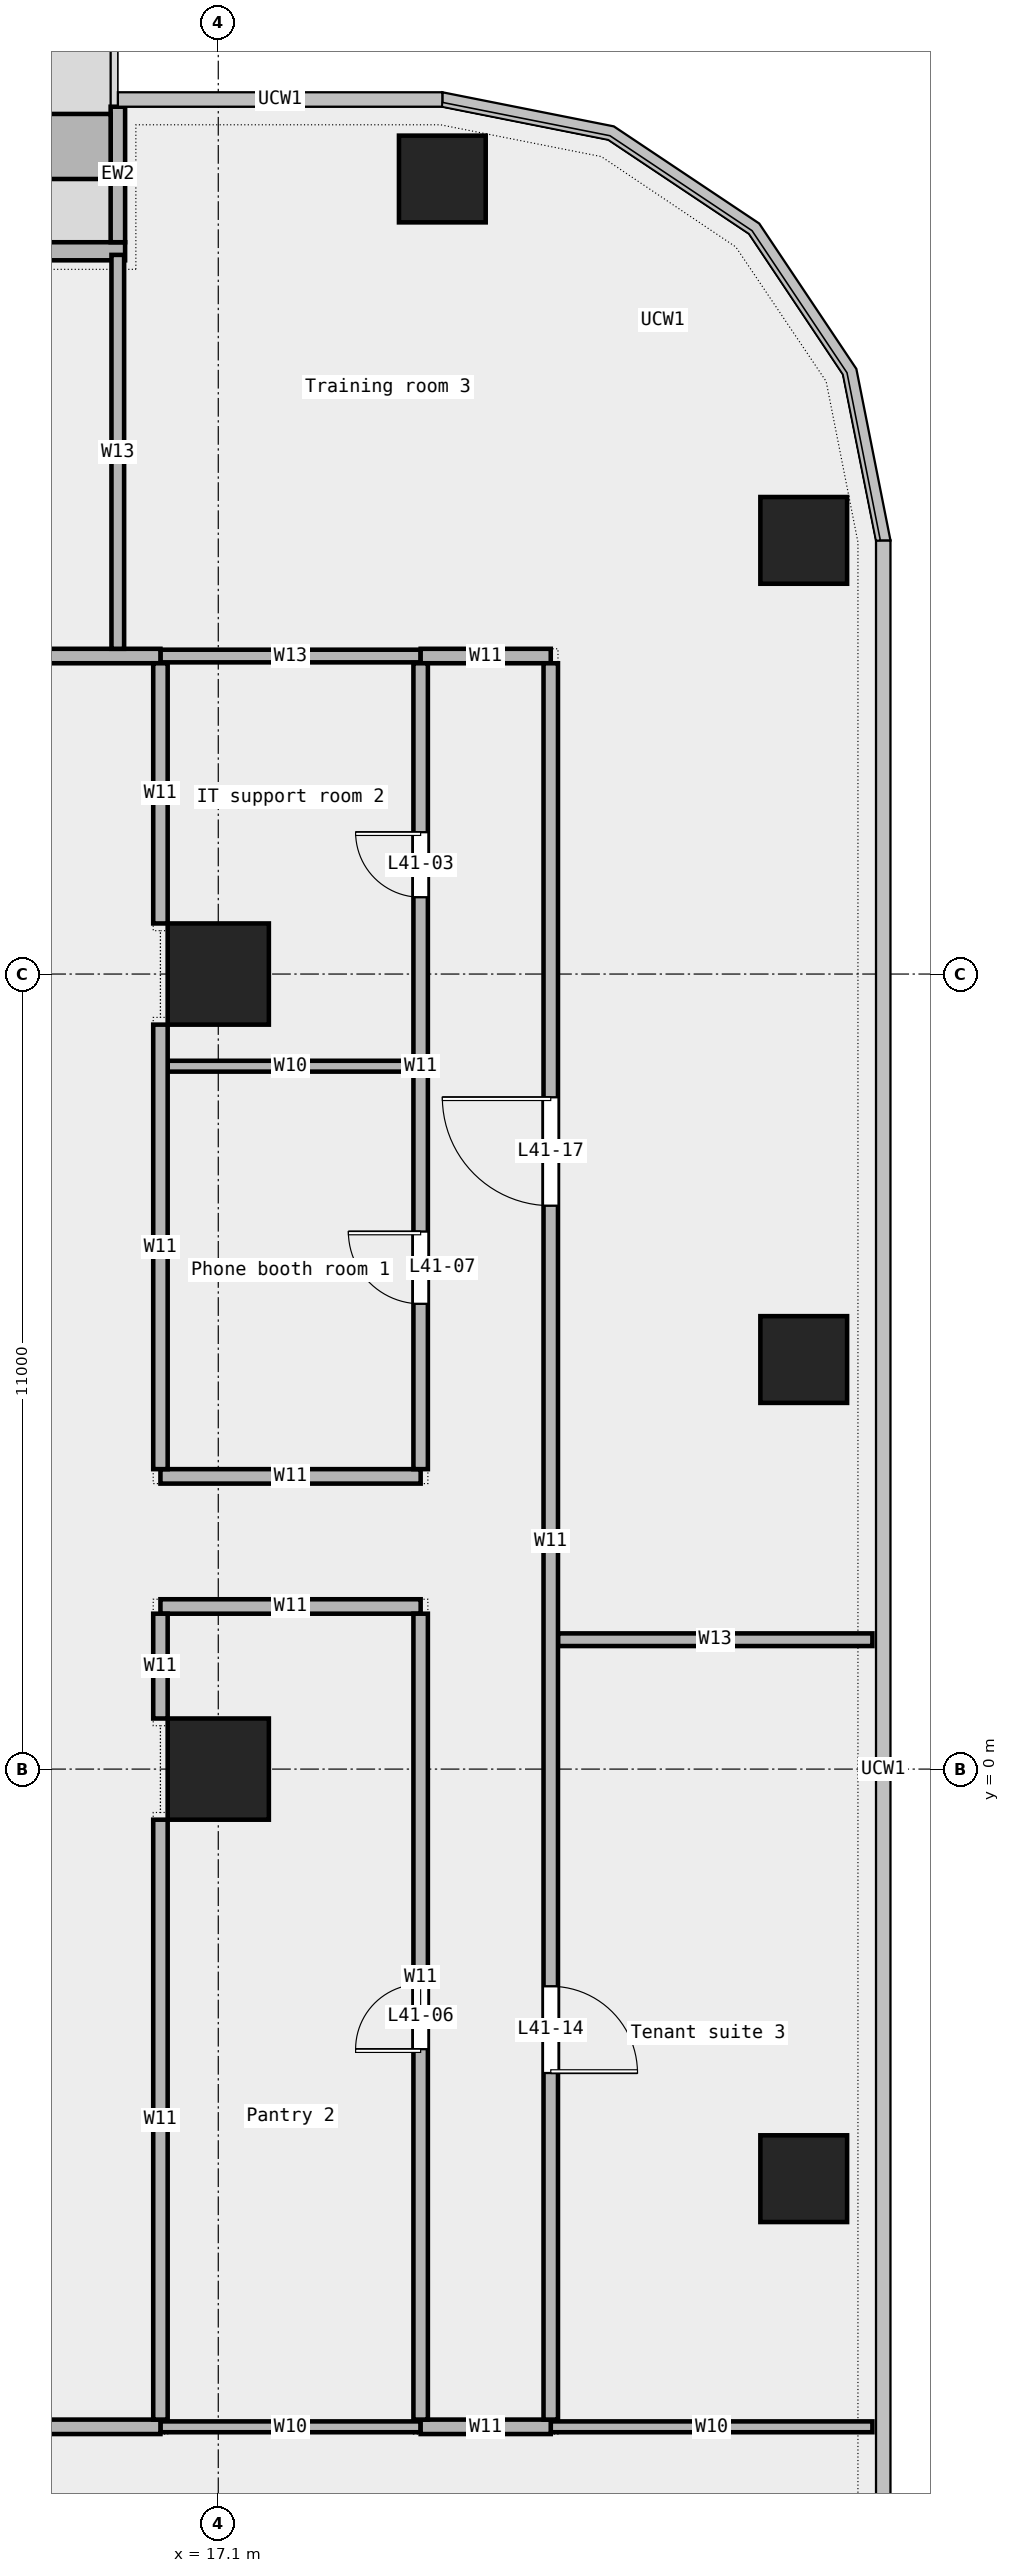
"""IFC4 building model, lengths in metres.
Left out: names, types, materials, properties, quantities, classifications, styles, units other than length and angle.
Written with IfcOpenShell. Run it as: python <this file> out.ifc"""

import sys

from ifc_helpers import new_model, si_unit, direction, frame, frame_2d, origin, origin_2d, place, context, subcontext, project, spatial, rectangle, extrude, element, fill, save


model = new_model("IFC4")
c1 = context("Model", 3, precision=1e-05, world=origin(), true_north=direction((0.0, 1.0)))
c2 = subcontext(c1, "Body", "Model", "MODEL_VIEW")
j1 = project(units=[si_unit("LENGTHUNIT", "METRE"), si_unit("PLANEANGLEUNIT", "RADIAN")], contexts=[c1])
p1 = place(None, origin())
s1 = spatial("IfcSite", under=j1, at=p1, CompositionType="ELEMENT")
p2 = place(p1, origin())
s2 = spatial("IfcBuilding", under=s1, at=p2, CompositionType="ELEMENT")
p3 = place(p2, frame((0.0, 0.0, 197.0)))
s3 = spatial("IfcBuildingStorey", under=s2, at=p3, CompositionType="ELEMENT", Elevation=197.0)
for number, where, z_axis, x_axis in (
    (1, (25.2, -5.667, 0.0), (0.0, 0.0, 1.0), (1.0, 0.0, 0.0)),
    (2, (25.2, 5.667, 0.0), (0.0, 0.0, 1.0), (1.0, 0.0, 0.0)),
    (3, (25.2, 17.0, 0.0), (0.0, 0.0, 1.0), (1.0, 0.0, 0.0)),
    (4, (20.2, 22.0, 0.0), (0.0, 0.0, 1.0), (1.0, 0.0, 0.0)),
):
    element("IfcColumn", number, at=place(p3, frame(where, z_axis=z_axis, x_axis=x_axis)), inside=s3, PredefinedType="COLUMN", context=c2, shape_type="SweptSolid", body=[
        extrude(rectangle(XDim=1.2, YDim=1.2, at=origin_2d()), origin(), (0.0, 0.0, 1.0), 3.6),
    ])
for number, where, z_axis, x_axis in (
    (5, (17.1, 0.0, 0.0), (0.0, 0.0, 1.0), (1.0, 0.0, 0.0)),
    (6, (17.1, 11.0, 0.0), (0.0, 0.0, 1.0), (1.0, 0.0, 0.0)),
):
    element("IfcColumn", number, at=place(p3, frame(where, z_axis=z_axis, x_axis=x_axis)), inside=s3, PredefinedType="COLUMN", context=c2, shape_type="SweptSolid", body=[
        extrude(rectangle(XDim=1.4, YDim=1.4, at=origin_2d()), origin(), (0.0, 0.0, 1.0), 3.6),
    ])
p4 = place(p3, frame((15.811, 21.0, 0.0), z_axis=(0.0, 0.0, 1.0), x_axis=(-1.0, 0.0, 0.0)))
e7 = element("IfcWall", 7, at=p4, inside=s3, PredefinedType="STANDARD", context=c2, shape_type="SweptSolid", body=[
    extrude(rectangle(XDim=13.667, YDim=0.25, at=frame_2d((6.833, 0.0))), origin(), (0.0, 0.0, 1.0), 3.6),
])
p5 = place(p4, frame((1.75, 0.0, 0.45)))
e8 = element("IfcOpeningElement", 8, at=p5, cuts=e7, PredefinedType="OPENING", context=c2, shape_type="SweptSolid", body=[
    extrude(rectangle(XDim=1.5, YDim=2.4, at=frame_2d((0.75, 1.2))), frame((0.0, 0.137, 0.0), z_axis=(0.0, -1.0, 0.0), x_axis=(1.0, 0.0, 0.0)), (0.0, 0.0, 1.0), 0.274),
])
p6 = place(p4, frame((6.75, 0.0, 0.0)))
e9 = element("IfcOpeningElement", 9, at=p6, cuts=e7, PredefinedType="OPENING", context=c2, shape_type="SweptSolid", body=[
    extrude(rectangle(XDim=1.8, YDim=2.4, at=frame_2d((0.9, 1.2))), frame((0.0, 0.137, 0.0), z_axis=(0.0, -1.0, 0.0), x_axis=(1.0, 0.0, 0.0)), (0.0, 0.0, 1.0), 0.274),
])
p7 = place(p4, frame((10.5, 0.0, 0.45)))
e10 = element("IfcOpeningElement", 10, at=p7, cuts=e7, PredefinedType="OPENING", context=c2, shape_type="SweptSolid", body=[
    extrude(rectangle(XDim=1.5, YDim=2.4, at=frame_2d((0.75, 1.2))), frame((0.0, 0.137, 0.0), z_axis=(0.0, -1.0, 0.0), x_axis=(1.0, 0.0, 0.0)), (0.0, 0.0, 1.0), 0.274),
])
p8 = place(p3, frame((15.711, 23.0, 0.0), z_axis=(0.0, 0.0, 1.0), x_axis=(0.0, -1.0, 0.0)))
e11 = element("IfcWall", 11, at=p8, inside=s3, PredefinedType="STANDARD", context=c2, shape_type="SweptSolid", body=[
    extrude(rectangle(XDim=1.875, YDim=0.2, at=frame_2d((0.938, 0.0))), origin(), (0.0, 0.0, 1.0), 3.6),
])
p9 = place(p3, frame((15.611, 22.45, 0.0), z_axis=(0.0, 0.0, 1.0), x_axis=(-1.0, 0.0, 0.0)))
e12 = element("IfcWall", 12, at=p9, inside=s3, PredefinedType="STANDARD", context=c2, shape_type="SweptSolid", body=[
    extrude(rectangle(XDim=3.6, YDim=0.9, at=frame_2d((1.8, 0.0))), origin(), (0.0, 0.0, 1.0), 0.7),
])
p10 = place(p3, frame((16.3, -9.1, 0.0), z_axis=(0.0, 0.0, 1.0), x_axis=(1.0, 0.0, 0.0)))
e13 = element("IfcWall", 13, at=p10, inside=s3, PredefinedType="PARTITIONING", context=c2, shape_type="SweptSolid", body=[
    extrude(rectangle(XDim=3.6, YDim=0.15, at=frame_2d((1.8, 0.0))), origin(), (0.0, 0.0, 1.0), 3.6),
])
p11 = place(p3, frame((21.7, -9.1, 0.0), z_axis=(0.0, 0.0, 1.0), x_axis=(1.0, 0.0, 0.0)))
e14 = element("IfcWall", 14, at=p11, inside=s3, PredefinedType="PARTITIONING", context=c2, shape_type="SweptSolid", body=[
    extrude(rectangle(XDim=4.45, YDim=0.15, at=frame_2d((2.225, 0.0))), origin(), (0.0, 0.0, 1.0), 3.6),
])
p12 = place(p3, frame((4.84, -9.1, 0.0), z_axis=(0.0, 0.0, 1.0), x_axis=(1.0, 0.0, 0.0)))
e15 = element("IfcWall", 15, at=p12, inside=s3, PredefinedType="PARTITIONING", context=c2, shape_type="SweptSolid", body=[
    extrude(rectangle(XDim=11.46, YDim=0.2, at=frame_2d((5.73, 0.0))), origin(), (0.0, 0.0, 1.0), 3.6),
])
p13 = place(p3, frame((19.9, -9.1, 0.0), z_axis=(0.0, 0.0, 1.0), x_axis=(1.0, 0.0, 0.0)))
e16 = element("IfcWall", 16, at=p13, inside=s3, PredefinedType="PARTITIONING", context=c2, shape_type="SweptSolid", body=[
    extrude(rectangle(XDim=1.8, YDim=0.2, at=frame_2d((0.9, 0.0))), origin(), (0.0, 0.0, 1.0), 3.6),
])
p14 = place(p3, frame((21.8, 1.79, 0.0), z_axis=(0.0, 0.0, 1.0), x_axis=(1.0, 0.0, 0.0)))
e17 = element("IfcWall", 17, at=p14, inside=s3, PredefinedType="PARTITIONING", context=c2, shape_type="SweptSolid", body=[
    extrude(rectangle(XDim=4.35, YDim=0.175, at=frame_2d((2.175, 0.0))), origin(), (0.0, 0.0, 1.0), 3.6),
])
for number, where, z_axis, x_axis in (
    (18, (16.3, 2.25, 0.0), (0.0, 0.0, 1.0), (1.0, 0.0, 0.0)),
    (19, (16.3, 4.05, 0.0), (0.0, 0.0, 1.0), (1.0, 0.0, 0.0)),
):
    element("IfcWall", number, at=place(p3, frame(where, z_axis=z_axis, x_axis=x_axis)), inside=s3, PredefinedType="PARTITIONING", context=c2, shape_type="SweptSolid", body=[
        extrude(rectangle(XDim=3.6, YDim=0.2, at=frame_2d((1.8, 0.0))), origin(), (0.0, 0.0, 1.0), 3.6),
    ])
p15 = place(p3, frame((16.4, 9.725, 0.0), z_axis=(0.0, 0.0, 1.0), x_axis=(1.0, 0.0, 0.0)))
e20 = element("IfcWall", 20, at=p15, inside=s3, PredefinedType="PARTITIONING", context=c2, shape_type="SweptSolid", body=[
    extrude(rectangle(XDim=3.4, YDim=0.15, at=frame_2d((1.7, 0.0))), origin(), (0.0, 0.0, 1.0), 3.6),
])
p16 = place(p3, frame((16.3, 15.4, 0.0), z_axis=(0.0, 0.0, 1.0), x_axis=(1.0, 0.0, 0.0)))
e21 = element("IfcWall", 21, at=p16, inside=s3, PredefinedType="PARTITIONING", context=c2, shape_type="SweptSolid", body=[
    extrude(rectangle(XDim=3.6, YDim=0.175, at=frame_2d((1.8, 0.0))), origin(), (0.0, 0.0, 1.0), 3.6),
])
p17 = place(p3, frame((-16.3, 15.4, 0.0), z_axis=(0.0, 0.0, 1.0), x_axis=(1.0, 0.0, 0.0)))
e22 = element("IfcWall", 22, at=p17, inside=s3, PredefinedType="PARTITIONING", context=c2, shape_type="SweptSolid", body=[
    extrude(rectangle(XDim=32.6, YDim=0.2, at=frame_2d((16.3, 0.0))), origin(), (0.0, 0.0, 1.0), 3.6),
])
p18 = place(p17, frame((10.185, 0.0, 0.0)))
e23 = element("IfcOpeningElement", 23, at=p18, cuts=e22, PredefinedType="OPENING", context=c2, shape_type="SweptSolid", body=[
    extrude(rectangle(XDim=1.5, YDim=2.1, at=frame_2d((0.75, 1.05))), frame((0.0, 0.112, 0.0), z_axis=(0.0, -1.0, 0.0), x_axis=(1.0, 0.0, 0.0)), (0.0, 0.0, 1.0), 0.224),
])
p19 = place(p17, frame((1.062, 0.0, 0.0)))
e24 = element("IfcOpeningElement", 24, at=p19, cuts=e22, PredefinedType="OPENING", context=c2, shape_type="SweptSolid", body=[
    extrude(rectangle(XDim=1.2, YDim=2.1, at=frame_2d((0.6, 1.05))), frame((0.0, 0.112, 0.0), z_axis=(0.0, -1.0, 0.0), x_axis=(1.0, 0.0, 0.0)), (0.0, 0.0, 1.0), 0.224),
])
p20 = place(p17, frame((24.677, 0.0, 0.0)))
e25 = element("IfcOpeningElement", 25, at=p20, cuts=e22, PredefinedType="OPENING", context=c2, shape_type="SweptSolid", body=[
    extrude(rectangle(XDim=1.2, YDim=2.1, at=frame_2d((0.6, 1.05))), frame((0.0, 0.112, 0.0), z_axis=(0.0, -1.0, 0.0), x_axis=(1.0, 0.0, 0.0)), (0.0, 0.0, 1.0), 0.224),
])
p21 = place(p3, frame((19.9, 15.4, 0.0), z_axis=(0.0, 0.0, 1.0), x_axis=(1.0, 0.0, 0.0)))
e26 = element("IfcWall", 26, at=p21, inside=s3, PredefinedType="PARTITIONING", context=c2, shape_type="SweptSolid", body=[
    extrude(rectangle(XDim=1.8, YDim=0.2, at=frame_2d((0.9, 0.0))), origin(), (0.0, 0.0, 1.0), 3.6),
])
p22 = place(p3, frame((15.71, 15.5, 0.0), z_axis=(0.0, 0.0, 1.0), x_axis=(0.0, 1.0, 0.0)))
e27 = element("IfcWall", 27, at=p22, inside=s3, PredefinedType="PARTITIONING", context=c2, shape_type="SweptSolid", body=[
    extrude(rectangle(XDim=5.45, YDim=0.175, at=frame_2d((2.725, 0.0))), origin(), (0.0, 0.0, 1.0), 3.6),
])
p23 = place(p3, frame((16.3, -9.0, 0.0), z_axis=(0.0, 0.0, 1.0), x_axis=(0.0, 1.0, 0.0)))
e28 = element("IfcWall", 28, at=p23, inside=s3, PredefinedType="PARTITIONING", context=c2, shape_type="SweptSolid", body=[
    extrude(rectangle(XDim=8.3, YDim=0.2, at=frame_2d((4.15, 0.0))), origin(), (0.0, 0.0, 1.0), 3.6),
])
p24 = place(p3, frame((16.3, 0.7, 0.0), z_axis=(0.0, 0.0, 1.0), x_axis=(0.0, 1.0, 0.0)))
e29 = element("IfcWall", 29, at=p24, inside=s3, PredefinedType="PARTITIONING", context=c2, shape_type="SweptSolid", body=[
    extrude(rectangle(XDim=1.45, YDim=0.2, at=frame_2d((0.725, 0.0))), origin(), (0.0, 0.0, 1.0), 3.6),
])
p25 = place(p3, frame((16.3, 4.15, 0.0), z_axis=(0.0, 0.0, 1.0), x_axis=(0.0, 1.0, 0.0)))
e30 = element("IfcWall", 30, at=p25, inside=s3, PredefinedType="PARTITIONING", context=c2, shape_type="SweptSolid", body=[
    extrude(rectangle(XDim=6.15, YDim=0.2, at=frame_2d((3.075, 0.0))), origin(), (0.0, 0.0, 1.0), 3.6),
])
p26 = place(p3, frame((16.3, 11.7, 0.0), z_axis=(0.0, 0.0, 1.0), x_axis=(0.0, 1.0, 0.0)))
e31 = element("IfcWall", 31, at=p26, inside=s3, PredefinedType="PARTITIONING", context=c2, shape_type="SweptSolid", body=[
    extrude(rectangle(XDim=3.6, YDim=0.2, at=frame_2d((1.8, 0.0))), origin(), (0.0, 0.0, 1.0), 3.6),
])
p27 = place(p3, frame((19.9, -9.0, 0.0), z_axis=(0.0, 0.0, 1.0), x_axis=(0.0, 1.0, 0.0)))
e32 = element("IfcWall", 32, at=p27, inside=s3, PredefinedType="PARTITIONING", context=c2, shape_type="SweptSolid", body=[
    extrude(rectangle(XDim=11.15, YDim=0.2, at=frame_2d((5.575, 0.0))), origin(), (0.0, 0.0, 1.0), 3.6),
])
p28 = place(p27, frame((5.125, 0.0, 0.0)))
e33 = element("IfcOpeningElement", 33, at=p28, cuts=e32, PredefinedType="OPENING", context=c2, shape_type="SweptSolid", body=[
    extrude(rectangle(XDim=0.9, YDim=2.1, at=frame_2d((0.45, 1.05))), frame((0.0, 0.112, 0.0), z_axis=(0.0, -1.0, 0.0), x_axis=(1.0, 0.0, 0.0)), (0.0, 0.0, 1.0), 0.224),
])
p29 = place(p3, frame((19.9, 4.15, 0.0), z_axis=(0.0, 0.0, 1.0), x_axis=(0.0, 1.0, 0.0)))
e34 = element("IfcWall", 34, at=p29, inside=s3, PredefinedType="PARTITIONING", context=c2, shape_type="SweptSolid", body=[
    extrude(rectangle(XDim=11.15, YDim=0.2, at=frame_2d((5.575, 0.0))), origin(), (0.0, 0.0, 1.0), 3.6),
])
p30 = place(p29, frame((7.913, 0.0, 0.0)))
e35 = element("IfcOpeningElement", 35, at=p30, cuts=e34, PredefinedType="OPENING", context=c2, shape_type="SweptSolid", body=[
    extrude(rectangle(XDim=0.9, YDim=2.1, at=frame_2d((0.45, 1.05))), frame((0.0, 0.112, 0.0), z_axis=(0.0, -1.0, 0.0), x_axis=(1.0, 0.0, 0.0)), (0.0, 0.0, 1.0), 0.224),
])
p31 = place(p29, frame((2.288, 0.0, 0.0)))
e36 = element("IfcOpeningElement", 36, at=p31, cuts=e34, PredefinedType="OPENING", context=c2, shape_type="SweptSolid", body=[
    extrude(rectangle(XDim=1.0, YDim=2.1, at=frame_2d((0.5, 1.05))), frame((0.0, 0.112, 0.0), z_axis=(0.0, -1.0, 0.0), x_axis=(1.0, 0.0, 0.0)), (0.0, 0.0, 1.0), 0.224),
])
p32 = place(p3, frame((21.7, -9.0, 0.0), z_axis=(0.0, 0.0, 1.0), x_axis=(0.0, 1.0, 0.0)))
e37 = element("IfcWall", 37, at=p32, inside=s3, PredefinedType="PARTITIONING", context=c2, shape_type="SweptSolid", body=[
    extrude(rectangle(XDim=24.3, YDim=0.2, at=frame_2d((12.15, 0.0))), origin(), (0.0, 0.0, 1.0), 3.6),
])
p33 = place(p32, frame((4.795, 0.0, 0.0)))
e38 = element("IfcOpeningElement", 38, at=p33, cuts=e37, PredefinedType="OPENING", context=c2, shape_type="SweptSolid", body=[
    extrude(rectangle(XDim=1.2, YDim=2.1, at=frame_2d((0.6, 1.05))), frame((0.0, 0.112, 0.0), z_axis=(0.0, -1.0, 0.0), x_axis=(1.0, 0.0, 0.0)), (0.0, 0.0, 1.0), 0.224),
])
p34 = place(p32, frame((16.795, 0.0, 0.0)))
e39 = element("IfcOpeningElement", 39, at=p34, cuts=e37, PredefinedType="OPENING", context=c2, shape_type="SweptSolid", body=[
    extrude(rectangle(XDim=1.5, YDim=2.1, at=frame_2d((0.75, 1.05))), frame((0.0, 0.112, 0.0), z_axis=(0.0, -1.0, 0.0), x_axis=(1.0, 0.0, 0.0)), (0.0, 0.0, 1.0), 0.224),
])
p35 = place(p30, origin())
e40 = element("IfcDoor", 40, at=p35, inside=s3, OperationType="SINGLE_SWING_RIGHT", PredefinedType="DOOR", context=c2, shape_type="SweptSolid", body=[
    extrude(rectangle(XDim=0.9, YDim=2.1, at=frame_2d((0.45, 1.05))), frame((0.0, 0.025, 0.0), z_axis=(0.0, -1.0, 0.0), x_axis=(1.0, 0.0, 0.0)), (0.0, 0.0, 1.0), 0.05),
])
fill(e35, e40)
p36 = place(p28, origin())
e41 = element("IfcDoor", 41, at=p36, inside=s3, OperationType="SINGLE_SWING_LEFT", PredefinedType="DOOR", context=c2, shape_type="SweptSolid", body=[
    extrude(rectangle(XDim=0.9, YDim=2.1, at=frame_2d((0.45, 1.05))), frame((0.0, 0.025, 0.0), z_axis=(0.0, -1.0, 0.0), x_axis=(1.0, 0.0, 0.0)), (0.0, 0.0, 1.0), 0.05),
])
fill(e33, e41)
p37 = place(p31, origin())
e42 = element("IfcDoor", 42, at=p37, inside=s3, OperationType="SINGLE_SWING_RIGHT", PredefinedType="DOOR", context=c2, shape_type="SweptSolid", body=[
    extrude(rectangle(XDim=1.0, YDim=2.1, at=frame_2d((0.5, 1.05))), frame((0.0, 0.025, 0.0), z_axis=(0.0, -1.0, 0.0), x_axis=(1.0, 0.0, 0.0)), (0.0, 0.0, 1.0), 0.05),
])
fill(e36, e42)
p38 = place(p33, origin())
e43 = element("IfcDoor", 43, at=p38, inside=s3, OperationType="SINGLE_SWING_RIGHT", PredefinedType="DOOR", context=c2, shape_type="SweptSolid", body=[
    extrude(rectangle(XDim=1.2, YDim=2.1, at=frame_2d((0.6, 1.05))), frame((0.0, 0.025, 0.0), z_axis=(0.0, -1.0, 0.0), x_axis=(1.0, 0.0, 0.0)), (0.0, 0.0, 1.0), 0.05),
])
fill(e38, e43)
p39 = place(p34, origin())
e44 = element("IfcDoor", 44, at=p39, inside=s3, OperationType="DOUBLE_DOOR_SINGLE_SWING", PredefinedType="DOOR", context=c2, shape_type="SweptSolid", body=[
    extrude(rectangle(XDim=1.5, YDim=2.1, at=frame_2d((0.75, 1.05))), frame((0.0, 0.025, 0.0), z_axis=(0.0, -1.0, 0.0), x_axis=(1.0, 0.0, 0.0)), (0.0, 0.0, 1.0), 0.05),
])
fill(e39, e44)
save(model, sys.argv[1])
